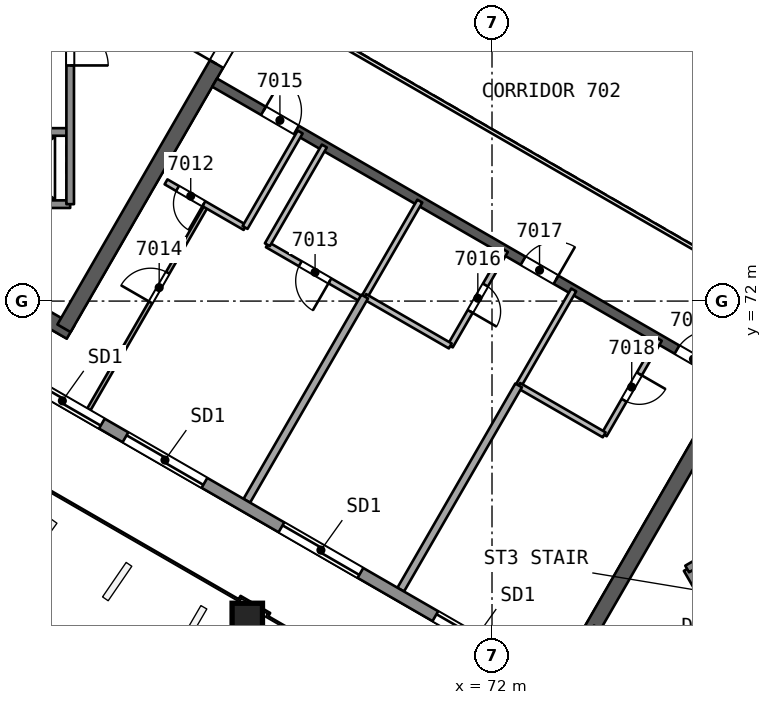
"""IFC4 building model, lengths in metres.
Left out: names, types, materials, properties, quantities, classifications, styles, units other than length and angle.
Written with IfcOpenShell. Run it as: python <this file> out.ifc"""

import sys

from ifc_helpers import new_model, si_unit, direction, frame, frame_2d, origin, origin_2d, place, context, subcontext, project, spatial, rectangle, extrude, element, fill, save


model = new_model("IFC4")
c1 = context("Model", 3, precision=1e-05, world=origin(), true_north=direction((0.0, 1.0)))
c2 = subcontext(c1, "Body", "Model", "MODEL_VIEW")
j1 = project(units=[si_unit("LENGTHUNIT", "METRE"), si_unit("PLANEANGLEUNIT", "RADIAN")], contexts=[c1])
p1 = place(None, origin())
s1 = spatial("IfcSite", under=j1, at=p1, CompositionType="ELEMENT")
p2 = place(p1, origin())
s2 = spatial("IfcBuilding", under=s1, at=p2, CompositionType="ELEMENT")
p3 = place(p2, frame((0.0, 0.0, 284.9)))
s3 = spatial("IfcBuildingStorey", under=s2, at=p3, CompositionType="ELEMENT", Elevation=284.9)
p4 = place(p3, frame((48.597, 78.293, 0.0), z_axis=(0.0, 0.0, 1.0), x_axis=(0.866026024469, -0.499998924941, 0.0)))
e1 = element("IfcWall", 1, at=p4, inside=s3, PredefinedType="SHEAR", context=c2, shape_type="SweptSolid", body=[
    extrude(rectangle(XDim=14.218, YDim=0.4, at=frame_2d((7.109, 0.0))), origin(), (0.0, 0.0, 1.0), 3.7),
])
p5 = place(p3, frame((60.737, 71.284, 0.0), z_axis=(0.0, 0.0, 1.0), x_axis=(0.50000547566, 0.866022242388, 0.0)))
e2 = element("IfcWall", 2, at=p5, inside=s3, PredefinedType="SHEAR", context=c2, shape_type="SweptSolid", body=[
    extrude(rectangle(XDim=10.18, YDim=0.4, at=frame_2d((5.09, 0.0))), origin(), (0.0, 0.0, 1.0), 3.7),
])
p6 = place(p5, frame((8.03, 0.0, 0.0)))
e3 = element("IfcOpeningElement", 3, at=p6, cuts=e2, PredefinedType="OPENING", context=c2, shape_type="SweptSolid", body=[
    extrude(rectangle(XDim=1.2, YDim=2.1, at=frame_2d((0.6, 1.05))), frame((0.0, 0.21, 0.0), z_axis=(0.0, -1.0, 0.0), x_axis=(1.0, 0.0, 0.0)), (0.0, 0.0, 1.0), 0.421),
])
p7 = place(p3, frame((79.615, 72.006, 0.0), z_axis=(0.0, 0.0, 1.0), x_axis=(-0.50000177223, -0.866024380585, 0.0)))
e4 = element("IfcWall", 4, at=p7, inside=s3, PredefinedType="SHEAR", context=c2, shape_type="SweptSolid", body=[
    extrude(rectangle(XDim=10.265, YDim=0.4, at=frame_2d((5.132, 0.0))), origin(), (0.0, 0.0, 1.0), 3.7),
])
p8 = place(p7, frame((0.834, 0.0, 0.0)))
e5 = element("IfcOpeningElement", 5, at=p8, cuts=e4, PredefinedType="OPENING", context=c2, shape_type="SweptSolid", body=[
    extrude(rectangle(XDim=1.2, YDim=2.1, at=frame_2d((0.6, 1.05))), frame((0.0, 0.21, 0.0), z_axis=(0.0, -1.0, 0.0), x_axis=(1.0, 0.0, 0.0)), (0.0, 0.0, 1.0), 0.421),
])
p9 = place(p3, frame((74.583, 63.29, 0.0), z_axis=(0.0, 0.0, 1.0), x_axis=(0.866024494188, -0.500001575463, 0.0)))
e6 = element("IfcWall", 6, at=p9, inside=s3, PredefinedType="SHEAR", context=c2, shape_type="SweptSolid", body=[
    extrude(rectangle(XDim=14.133, YDim=0.4, at=frame_2d((7.067, 0.0))), origin(), (0.0, 0.0, 1.0), 3.7),
])
p10 = place(p3, frame((64.7, 77.748, 0.0), z_axis=(0.0, 0.0, 1.0), x_axis=(0.866026492143, -0.499998114903, 0.0)))
e7 = element("IfcWall", 7, at=p10, inside=s3, PredefinedType="SHEAR", context=c2, shape_type="SweptSolid", body=[
    extrude(rectangle(XDim=15.588, YDim=0.25, at=frame_2d((7.794, 0.0))), origin(), (0.0, 0.0, 1.0), 3.3),
])
p11 = place(p10, frame((1.485, 0.0, 0.0)))
e8 = element("IfcOpeningElement", 8, at=p11, cuts=e7, PredefinedType="OPENING", context=c2, shape_type="SweptSolid", body=[
    extrude(rectangle(XDim=1.0, YDim=2.1, at=frame_2d((0.5, 1.05))), frame((0.0, 0.135, 0.0), z_axis=(0.0, -1.0, 0.0), x_axis=(1.0, 0.0, 0.0)), (0.0, 0.0, 1.0), 0.271),
])
p12 = place(p10, frame((9.374, 0.0, 0.0)))
e9 = element("IfcOpeningElement", 9, at=p12, cuts=e7, PredefinedType="OPENING", context=c2, shape_type="SweptSolid", body=[
    extrude(rectangle(XDim=1.0, YDim=2.1, at=frame_2d((0.5, 1.05))), frame((0.0, 0.135, 0.0), z_axis=(0.0, -1.0, 0.0), x_axis=(1.0, 0.0, 0.0)), (0.0, 0.0, 1.0), 0.271),
])
p13 = place(p10, frame((14.05, 0.0, 0.0)))
e10 = element("IfcOpeningElement", 10, at=p13, cuts=e7, PredefinedType="OPENING", context=c2, shape_type="SweptSolid", body=[
    extrude(rectangle(XDim=1.0, YDim=2.1, at=frame_2d((0.5, 1.05))), frame((0.0, 0.135, 0.0), z_axis=(0.0, -1.0, 0.0), x_axis=(1.0, 0.0, 0.0)), (0.0, 0.0, 1.0), 0.271),
])
p14 = place(p3, frame((65.548, 63.629, 0.0), z_axis=(0.010092954999, 0.017481261926, 0.999796248113), x_axis=(-0.866025993948, 0.499998977805, 1.48321e-07)))
e11 = element("IfcColumn", 11, at=p14, inside=s3, PredefinedType="COLUMN", context=c2, shape_type="SweptSolid", body=[
    extrude(rectangle(XDim=0.8, YDim=0.8, at=origin_2d()), origin(), (0.0, 0.0, 1.0), 3.701),
])
p15 = place(p3, frame((61.39, 69.146, 0.0), z_axis=(0.0, 0.0, 1.0), x_axis=(0.499986136558, 0.866033407698, 0.0)))
e12 = element("IfcWall", 12, at=p15, inside=s3, PredefinedType="PARTITIONING", context=c2, shape_type="SweptSolid", body=[
    extrude(rectangle(XDim=6.225, YDim=0.1, at=frame_2d((3.112, 0.0))), origin(), (0.0, 0.0, 1.0), 3.3),
])
p16 = place(p15, frame((3.255, 0.0, 0.0)))
e13 = element("IfcOpeningElement", 13, at=p16, cuts=e12, PredefinedType="OPENING", context=c2, shape_type="SweptSolid", body=[
    extrude(rectangle(XDim=0.9, YDim=2.1, at=frame_2d((0.45, 1.05))), frame((0.0, 0.061, 0.0), z_axis=(0.0, -1.0, 0.0), x_axis=(1.0, 0.0, 0.0)), (0.0, 0.0, 1.0), 0.121),
])
p17 = place(p3, frame((65.502, 73.937, 0.0), z_axis=(0.0, 0.0, 1.0), x_axis=(-0.865994240961, 0.500053971709, 0.0)))
e14 = element("IfcWall", 14, at=p17, inside=s3, PredefinedType="PARTITIONING", context=c2, shape_type="SweptSolid", body=[
    extrude(rectangle(XDim=2.401, YDim=0.15, at=frame_2d((1.201, 0.0))), origin(), (0.0, 0.0, 1.0), 3.3),
])
p18 = place(p17, frame((1.251, 0.0, 0.0)))
e15 = element("IfcOpeningElement", 15, at=p18, cuts=e14, PredefinedType="OPENING", context=c2, shape_type="SweptSolid", body=[
    extrude(rectangle(XDim=0.8, YDim=2.1, at=frame_2d((0.4, 1.05))), frame((0.0, 0.085, 0.0), z_axis=(0.0, -1.0, 0.0), x_axis=(1.0, 0.0, 0.0)), (0.0, 0.0, 1.0), 0.171),
])
p19 = place(p3, frame((66.952, 76.448, 0.0), z_axis=(0.0, 0.0, 1.0), x_axis=(-0.499987231761, -0.866032775405, 0.0)))
e16 = element("IfcWall", 16, at=p19, inside=s3, PredefinedType="PARTITIONING", context=c2, shape_type="SweptSolid", body=[
    extrude(rectangle(XDim=2.9, YDim=0.15, at=frame_2d((1.45, 0.0))), origin(), (0.0, 0.0, 1.0), 3.3),
])
p20 = place(p3, frame((70.1, 74.631, 0.0), z_axis=(0.0, 0.0, 1.0), x_axis=(-0.499990139034, -0.866031096941, 0.0)))
e17 = element("IfcWall", 17, at=p20, inside=s3, PredefinedType="PARTITIONING", context=c2, shape_type="SweptSolid", body=[
    extrude(rectangle(XDim=3.0, YDim=0.15, at=frame_2d((1.5, 0.0))), origin(), (0.0, 0.0, 1.0), 3.3),
])
p21 = place(p3, frame((68.6, 72.032, 0.0), z_axis=(0.0, 0.0, 1.0), x_axis=(-0.865996321171, 0.50005036918, 0.0)))
e18 = element("IfcWall", 18, at=p21, inside=s3, PredefinedType="PARTITIONING", context=c2, shape_type="SweptSolid", body=[
    extrude(rectangle(XDim=2.9, YDim=0.15, at=frame_2d((1.45, 0.0))), origin(), (0.0, 0.0, 1.0), 3.3),
])
p22 = place(p21, frame((1.0, 0.0, 0.0)))
e19 = element("IfcOpeningElement", 19, at=p22, cuts=e18, PredefinedType="OPENING", context=c2, shape_type="SweptSolid", body=[
    extrude(rectangle(XDim=0.9, YDim=2.1, at=frame_2d((0.45, 1.05))), frame((0.0, 0.085, 0.0), z_axis=(0.0, -1.0, 0.0), x_axis=(1.0, 0.0, 0.0)), (0.0, 0.0, 1.0), 0.171),
])
p23 = place(p3, frame((66.089, 73.483, 0.0), z_axis=(0.0, 0.0, 1.0), x_axis=(0.50002537861, 0.866010750942, 0.0)))
e20 = element("IfcWall", 20, at=p23, inside=s3, PredefinedType="PARTITIONING", context=c2, shape_type="SweptSolid", body=[
    extrude(rectangle(XDim=3.0, YDim=0.15, at=frame_2d((1.5, 0.0))), origin(), (0.0, 0.0, 1.0), 3.3),
])
p24 = place(p3, frame((65.548, 66.746, 0.0), z_axis=(0.0, 0.0, 1.0), x_axis=(0.499985851886, 0.866033572048, 0.0)))
e21 = element("IfcWall", 21, at=p24, inside=s3, PredefinedType="PARTITIONING", context=c2, shape_type="SweptSolid", body=[
    extrude(rectangle(XDim=6.205, YDim=0.2, at=frame_2d((3.103, 0.0))), origin(), (0.0, 0.0, 1.0), 3.3),
])
p25 = place(p3, frame((72.352, 73.331, 0.0), z_axis=(0.0, 0.0, 1.0), x_axis=(-0.499987231761, -0.866032775405, 0.0)))
e22 = element("IfcWall", 22, at=p25, inside=s3, PredefinedType="PARTITIONING", context=c2, shape_type="SweptSolid", body=[
    extrude(rectangle(XDim=2.9, YDim=0.15, at=frame_2d((1.45, 0.0))), origin(), (0.0, 0.0, 1.0), 3.3),
])
p26 = place(p25, frame((1.05, 0.0, 0.0)))
e23 = element("IfcOpeningElement", 23, at=p26, cuts=e22, PredefinedType="OPENING", context=c2, shape_type="SweptSolid", body=[
    extrude(rectangle(XDim=0.8, YDim=2.1, at=frame_2d((0.4, 1.05))), frame((0.0, 0.085, 0.0), z_axis=(0.0, -1.0, 0.0), x_axis=(1.0, 0.0, 0.0)), (0.0, 0.0, 1.0), 0.171),
])
p27 = place(p3, frame((70.902, 70.819, 0.0), z_axis=(0.0, 0.0, 1.0), x_axis=(-0.866021400173, 0.500006934395, 0.0)))
e24 = element("IfcWall", 24, at=p27, inside=s3, PredefinedType="PARTITIONING", context=c2, shape_type="SweptSolid", body=[
    extrude(rectangle(XDim=2.6, YDim=0.15, at=frame_2d((1.3, 0.0))), origin(), (0.0, 0.0, 1.0), 3.3),
])
p28 = place(p3, frame((69.598, 64.407, 0.0), z_axis=(0.0, 0.0, 1.0), x_axis=(0.499985851886, 0.866033572048, 0.0)))
e25 = element("IfcWall", 25, at=p28, inside=s3, PredefinedType="PARTITIONING", context=c2, shape_type="SweptSolid", body=[
    extrude(rectangle(XDim=6.205, YDim=0.2, at=frame_2d((3.103, 0.0))), origin(), (0.0, 0.0, 1.0), 3.3),
])
p29 = place(p3, frame((72.7, 69.781, 0.0), z_axis=(0.0, 0.0, 1.0), x_axis=(0.499987231761, 0.866032775405, 0.0)))
e26 = element("IfcWall", 26, at=p29, inside=s3, PredefinedType="PARTITIONING", context=c2, shape_type="SweptSolid", body=[
    extrude(rectangle(XDim=2.9, YDim=0.15, at=frame_2d((1.45, 0.0))), origin(), (0.0, 0.0, 1.0), 3.3),
])
p30 = place(p3, frame((76.402, 70.992, 0.0), z_axis=(0.0, 0.0, 1.0), x_axis=(-0.499987231761, -0.866032775405, 0.0)))
e27 = element("IfcWall", 27, at=p30, inside=s3, PredefinedType="PARTITIONING", context=c2, shape_type="SweptSolid", body=[
    extrude(rectangle(XDim=2.9, YDim=0.15, at=frame_2d((1.45, 0.0))), origin(), (0.0, 0.0, 1.0), 3.3),
])
p31 = place(p30, frame((1.05, 0.0, 0.0)))
e28 = element("IfcOpeningElement", 28, at=p31, cuts=e27, PredefinedType="OPENING", context=c2, shape_type="SweptSolid", body=[
    extrude(rectangle(XDim=0.8, YDim=2.1, at=frame_2d((0.4, 1.05))), frame((0.0, 0.085, 0.0), z_axis=(0.0, -1.0, 0.0), x_axis=(1.0, 0.0, 0.0)), (0.0, 0.0, 1.0), 0.171),
])
p32 = place(p3, frame((74.952, 68.481, 0.0), z_axis=(0.0, 0.0, 1.0), x_axis=(-0.866021400173, 0.500006934395, 0.0)))
e29 = element("IfcWall", 29, at=p32, inside=s3, PredefinedType="PARTITIONING", context=c2, shape_type="SweptSolid", body=[
    extrude(rectangle(XDim=2.6, YDim=0.15, at=frame_2d((1.3, 0.0))), origin(), (0.0, 0.0, 1.0), 3.3),
])
p33 = place(p3, frame((87.188, 54.08, 0.0), z_axis=(0.0, 0.0, 1.0), x_axis=(-0.866024534676, 0.500001505337, 0.0)))
e30 = element("IfcWall", 30, at=p33, inside=s3, PredefinedType="SOLIDWALL", context=c2, shape_type="SweptSolid", body=[
    extrude(rectangle(XDim=47.03, YDim=0.3, at=frame_2d((23.515, 0.0))), origin(), (0.0, 0.0, 1.0), 3.3),
])
p34 = place(p33, frame((29.392, 0.0, 0.0)))
e31 = element("IfcOpeningElement", 31, at=p34, cuts=e30, PredefinedType="OPENING", context=c2, shape_type="SweptSolid", body=[
    extrude(rectangle(XDim=2.4, YDim=2.4, at=frame_2d((1.2, 1.2))), frame((0.0, 0.161, 0.0), z_axis=(0.0, -1.0, 0.0), x_axis=(1.0, 0.0, 0.0)), (0.0, 0.0, 1.0), 0.321),
])
p35 = place(p33, frame((26.274, 0.0, 0.0)))
e32 = element("IfcOpeningElement", 32, at=p35, cuts=e30, PredefinedType="OPENING", context=c2, shape_type="SweptSolid", body=[
    extrude(rectangle(XDim=2.4, YDim=2.4, at=frame_2d((1.2, 1.2))), frame((0.0, 0.161, 0.0), z_axis=(0.0, -1.0, 0.0), x_axis=(1.0, 0.0, 0.0)), (0.0, 0.0, 1.0), 0.321),
])
p36 = place(p33, frame((16.859, 0.0, 0.0)))
e33 = element("IfcOpeningElement", 33, at=p36, cuts=e30, PredefinedType="OPENING", context=c2, shape_type="SweptSolid", body=[
    extrude(rectangle(XDim=2.4, YDim=2.4, at=frame_2d((1.2, 1.2))), frame((0.0, 0.161, 0.0), z_axis=(0.0, -1.0, 0.0), x_axis=(1.0, 0.0, 0.0)), (0.0, 0.0, 1.0), 0.321),
])
p37 = place(p33, frame((21.536, 0.0, 0.0)))
e34 = element("IfcOpeningElement", 34, at=p37, cuts=e30, PredefinedType="OPENING", context=c2, shape_type="SweptSolid", body=[
    extrude(rectangle(XDim=2.4, YDim=2.4, at=frame_2d((1.2, 1.2))), frame((0.0, 0.161, 0.0), z_axis=(0.0, -1.0, 0.0), x_axis=(1.0, 0.0, 0.0)), (0.0, 0.0, 1.0), 0.321),
])
for number, where, z_axis, x_axis in (
    (35, (60.9, 76.45, 0.0), (0.0, 0.0, 1.0), (-1.0, 0.0, 0.0)),
    (36, (60.9, 74.55, 0.0), (0.0, 0.0, 1.0), (-1.0, 0.0, 0.0)),
):
    element("IfcWall", number, at=place(p3, frame(where, z_axis=z_axis, x_axis=x_axis)), inside=s3, PredefinedType="SOLIDWALL", context=c2, shape_type="SweptSolid", body=[
        extrude(rectangle(XDim=3.05, YDim=0.2, at=frame_2d((1.525, 0.0))), origin(), (0.0, 0.0, 1.0), 3.3),
    ])
p38 = place(p3, frame((60.9, 85.45, 0.0), z_axis=(0.0, 0.0, 1.0), x_axis=(0.0, -1.0, 0.0)))
e37 = element("IfcWall", 37, at=p38, inside=s3, PredefinedType="SOLIDWALL", context=c2, shape_type="SweptSolid", body=[
    extrude(rectangle(XDim=10.9, YDim=0.2, at=frame_2d((5.45, 0.0))), origin(), (0.0, 0.0, 1.0), 3.3),
])
p39 = place(p38, frame((0.625, 0.0, 0.0)))
e38 = element("IfcOpeningElement", 38, at=p39, cuts=e37, PredefinedType="OPENING", context=c2, shape_type="SweptSolid", body=[
    extrude(rectangle(XDim=1.0, YDim=2.1, at=frame_2d((0.5, 1.05))), frame((0.0, 0.11, 0.0), z_axis=(0.0, -1.0, 0.0), x_axis=(1.0, 0.0, 0.0)), (0.0, 0.0, 1.0), 0.221),
])
p40 = place(p38, frame((2.875, 0.0, 0.0)))
e39 = element("IfcOpeningElement", 39, at=p40, cuts=e37, PredefinedType="OPENING", context=c2, shape_type="SweptSolid", body=[
    extrude(rectangle(XDim=1.0, YDim=2.1, at=frame_2d((0.5, 1.05))), frame((0.0, 0.11, 0.0), z_axis=(0.0, -1.0, 0.0), x_axis=(1.0, 0.0, 0.0)), (0.0, 0.0, 1.0), 0.221),
])
p41 = place(p38, frame((6.25, 0.0, 0.0)))
e40 = element("IfcOpeningElement", 40, at=p41, cuts=e37, PredefinedType="OPENING", context=c2, shape_type="SweptSolid", body=[
    extrude(rectangle(XDim=1.0, YDim=2.1, at=frame_2d((0.5, 1.05))), frame((0.0, 0.11, 0.0), z_axis=(0.0, -1.0, 0.0), x_axis=(1.0, 0.0, 0.0)), (0.0, 0.0, 1.0), 0.221),
])
p42 = place(p3, frame((77.135, 64.952, 0.0), z_axis=(0.0, 0.0, 1.0), x_axis=(0.499996545922, -0.866027397988, 0.0)))
e41 = element("IfcWall", 41, at=p42, inside=s3, PredefinedType="SOLIDWALL", context=c2, shape_type="SweptSolid", body=[
    extrude(rectangle(XDim=2.75, YDim=0.2, at=frame_2d((1.375, 0.0))), origin(), (0.0, 0.0, 1.0), 3.3),
])
p43 = place(p3, frame((77.135, 64.952, 0.0), z_axis=(0.0, 0.0, 1.0), x_axis=(0.866031916153, 0.499988720078, 0.0)))
e42 = element("IfcWall", 42, at=p43, inside=s3, PredefinedType="SOLIDWALL", context=c2, shape_type="SweptSolid", body=[
    extrude(rectangle(XDim=11.35, YDim=0.2, at=frame_2d((5.675, 0.0))), origin(), (0.0, 0.0, 1.0), 3.3),
])
p44 = place(p43, frame((2.875, 0.0, 0.0)))
e43 = element("IfcOpeningElement", 43, at=p44, cuts=e42, PredefinedType="OPENING", context=c2, shape_type="SweptSolid", body=[
    extrude(rectangle(XDim=1.1, YDim=2.1, at=frame_2d((0.55, 1.05))), frame((0.0, 0.11, 0.0), z_axis=(0.0, -1.0, 0.0), x_axis=(1.0, 0.0, 0.0)), (0.0, 0.0, 1.0), 0.221),
])
p45 = place(p43, frame((5.125, 0.0, 0.0)))
e44 = element("IfcOpeningElement", 44, at=p45, cuts=e42, PredefinedType="OPENING", context=c2, shape_type="SweptSolid", body=[
    extrude(rectangle(XDim=1.1, YDim=2.1, at=frame_2d((0.55, 1.05))), frame((0.0, 0.11, 0.0), z_axis=(0.0, -1.0, 0.0), x_axis=(1.0, 0.0, 0.0)), (0.0, 0.0, 1.0), 0.221),
])
p46 = place(p43, frame((7.375, 0.0, 0.0)))
e45 = element("IfcOpeningElement", 45, at=p46, cuts=e42, PredefinedType="OPENING", context=c2, shape_type="SweptSolid", body=[
    extrude(rectangle(XDim=1.1, YDim=2.1, at=frame_2d((0.55, 1.05))), frame((0.0, 0.11, 0.0), z_axis=(0.0, -1.0, 0.0), x_axis=(1.0, 0.0, 0.0)), (0.0, 0.0, 1.0), 0.221),
])
p47 = place(p3, frame((67.702, 78.948, 0.0), z_axis=(0.0, 0.0, 1.0), x_axis=(0.866026658274, -0.499997827154, 0.0)))
e46 = element("IfcWall", 46, at=p47, inside=s3, PredefinedType="PARTITIONING", context=c2, shape_type="SweptSolid", body=[
    extrude(rectangle(XDim=11.588, YDim=0.1, at=frame_2d((5.794, 0.0))), origin(), (0.0, 0.0, 1.0), 3.3),
])
p48 = place(p18, origin())
e47 = element("IfcDoor", 47, at=p48, inside=s3, OperationType="SINGLE_SWING_LEFT", PredefinedType="NOTDEFINED", context=c2, shape_type="SweptSolid", body=[
    extrude(rectangle(XDim=0.8, YDim=2.1, at=frame_2d((0.4, 1.05))), frame((0.0, 0.025, 0.0), z_axis=(0.0, -1.0, 0.0), x_axis=(1.0, 0.0, 0.0)), (0.0, 0.0, 1.0), 0.05),
])
fill(e15, e47)
p49 = place(p22, origin())
e48 = element("IfcDoor", 48, at=p49, inside=s3, OperationType="SINGLE_SWING_LEFT", PredefinedType="NOTDEFINED", context=c2, shape_type="SweptSolid", body=[
    extrude(rectangle(XDim=0.9, YDim=2.1, at=frame_2d((0.45, 1.05))), frame((0.0, 0.025, 0.0), z_axis=(0.0, -1.0, 0.0), x_axis=(1.0, 0.0, 0.0)), (0.0, 0.0, 1.0), 0.05),
])
fill(e19, e48)
p50 = place(p16, origin())
e49 = element("IfcDoor", 49, at=p50, inside=s3, OperationType="SINGLE_SWING_LEFT", PredefinedType="NOTDEFINED", context=c2, shape_type="SweptSolid", body=[
    extrude(rectangle(XDim=0.9, YDim=2.1, at=frame_2d((0.45, 1.05))), frame((0.0, 0.025, 0.0), z_axis=(0.0, -1.0, 0.0), x_axis=(1.0, 0.0, 0.0)), (0.0, 0.0, 1.0), 0.05),
])
fill(e13, e49)
p51 = place(p11, origin())
e50 = element("IfcDoor", 50, at=p51, inside=s3, OperationType="SINGLE_SWING_LEFT", PredefinedType="NOTDEFINED", context=c2, shape_type="SweptSolid", body=[
    extrude(rectangle(XDim=1.0, YDim=2.1, at=frame_2d((0.5, 1.05))), frame((0.0, 0.025, 0.0), z_axis=(0.0, -1.0, 0.0), x_axis=(1.0, 0.0, 0.0)), (0.0, 0.0, 1.0), 0.05),
])
fill(e8, e50)
p52 = place(p26, origin())
e51 = element("IfcDoor", 51, at=p52, inside=s3, OperationType="SINGLE_SWING_RIGHT", PredefinedType="NOTDEFINED", context=c2, shape_type="SweptSolid", body=[
    extrude(rectangle(XDim=0.8, YDim=2.1, at=frame_2d((0.4, 1.05))), frame((0.0, 0.025, 0.0), z_axis=(0.0, -1.0, 0.0), x_axis=(1.0, 0.0, 0.0)), (0.0, 0.0, 1.0), 0.05),
])
fill(e23, e51)
p53 = place(p12, origin())
e52 = element("IfcDoor", 52, at=p53, inside=s3, OperationType="SINGLE_SWING_RIGHT", PredefinedType="NOTDEFINED", context=c2, shape_type="SweptSolid", body=[
    extrude(rectangle(XDim=1.0, YDim=2.1, at=frame_2d((0.5, 1.05))), frame((0.0, 0.025, 0.0), z_axis=(0.0, -1.0, 0.0), x_axis=(1.0, 0.0, 0.0)), (0.0, 0.0, 1.0), 0.05),
])
fill(e9, e52)
p54 = place(p31, origin())
e53 = element("IfcDoor", 53, at=p54, inside=s3, OperationType="SINGLE_SWING_LEFT", PredefinedType="NOTDEFINED", context=c2, shape_type="SweptSolid", body=[
    extrude(rectangle(XDim=0.8, YDim=2.1, at=frame_2d((0.4, 1.05))), frame((0.0, 0.025, 0.0), z_axis=(0.0, -1.0, 0.0), x_axis=(1.0, 0.0, 0.0)), (0.0, 0.0, 1.0), 0.05),
])
fill(e28, e53)
p55 = place(p13, origin())
e54 = element("IfcDoor", 54, at=p55, inside=s3, OperationType="SINGLE_SWING_RIGHT", PredefinedType="NOTDEFINED", context=c2, shape_type="SweptSolid", body=[
    extrude(rectangle(XDim=1.0, YDim=2.1, at=frame_2d((0.5, 1.05))), frame((0.0, 0.025, 0.0), z_axis=(0.0, -1.0, 0.0), x_axis=(1.0, 0.0, 0.0)), (0.0, 0.0, 1.0), 0.05),
])
fill(e10, e54)
p56 = place(p34, origin())
e55 = element("IfcDoor", 55, at=p56, inside=s3, OperationType="SLIDING_TO_LEFT", PredefinedType="NOTDEFINED", context=c2, shape_type="SweptSolid", body=[
    extrude(rectangle(XDim=2.4, YDim=2.4, at=frame_2d((1.2, 1.2))), frame((0.0, 0.025, 0.0), z_axis=(0.0, -1.0, 0.0), x_axis=(1.0, 0.0, 0.0)), (0.0, 0.0, 1.0), 0.05),
])
fill(e31, e55)
p57 = place(p35, origin())
e56 = element("IfcDoor", 56, at=p57, inside=s3, OperationType="SLIDING_TO_RIGHT", PredefinedType="NOTDEFINED", context=c2, shape_type="SweptSolid", body=[
    extrude(rectangle(XDim=2.4, YDim=2.4, at=frame_2d((1.2, 1.2))), frame((0.0, 0.025, 0.0), z_axis=(0.0, -1.0, 0.0), x_axis=(1.0, 0.0, 0.0)), (0.0, 0.0, 1.0), 0.05),
])
fill(e32, e56)
p58 = place(p36, origin())
e57 = element("IfcDoor", 57, at=p58, inside=s3, OperationType="SLIDING_TO_LEFT", PredefinedType="NOTDEFINED", context=c2, shape_type="SweptSolid", body=[
    extrude(rectangle(XDim=2.4, YDim=2.4, at=frame_2d((1.2, 1.2))), frame((0.0, 0.025, 0.0), z_axis=(0.0, -1.0, 0.0), x_axis=(1.0, 0.0, 0.0)), (0.0, 0.0, 1.0), 0.05),
])
fill(e33, e57)
p59 = place(p37, origin())
e58 = element("IfcDoor", 58, at=p59, inside=s3, OperationType="SLIDING_TO_RIGHT", PredefinedType="NOTDEFINED", context=c2, shape_type="SweptSolid", body=[
    extrude(rectangle(XDim=2.4, YDim=2.4, at=frame_2d((1.2, 1.2))), frame((0.0, 0.025, 0.0), z_axis=(0.0, -1.0, 0.0), x_axis=(1.0, 0.0, 0.0)), (0.0, 0.0, 1.0), 0.05),
])
fill(e34, e58)
p60 = place(p6, origin())
e59 = element("IfcDoor", 59, at=p60, inside=s3, OperationType="SINGLE_SWING_LEFT", PredefinedType="NOTDEFINED", context=c2, shape_type="SweptSolid", body=[
    extrude(rectangle(XDim=1.2, YDim=2.1, at=frame_2d((0.6, 1.05))), frame((0.0, 0.025, 0.0), z_axis=(0.0, -1.0, 0.0), x_axis=(1.0, 0.0, 0.0)), (0.0, 0.0, 1.0), 0.05),
])
fill(e3, e59)
p61 = place(p41, origin())
e60 = element("IfcDoor", 60, at=p61, inside=s3, OperationType="SINGLE_SWING_RIGHT", PredefinedType="NOTDEFINED", context=c2, shape_type="SweptSolid", body=[
    extrude(rectangle(XDim=1.0, YDim=2.1, at=frame_2d((0.5, 1.05))), frame((0.0, 0.025, 0.0), z_axis=(0.0, -1.0, 0.0), x_axis=(1.0, 0.0, 0.0)), (0.0, 0.0, 1.0), 0.05),
])
fill(e40, e60)
save(model, sys.argv[1])
